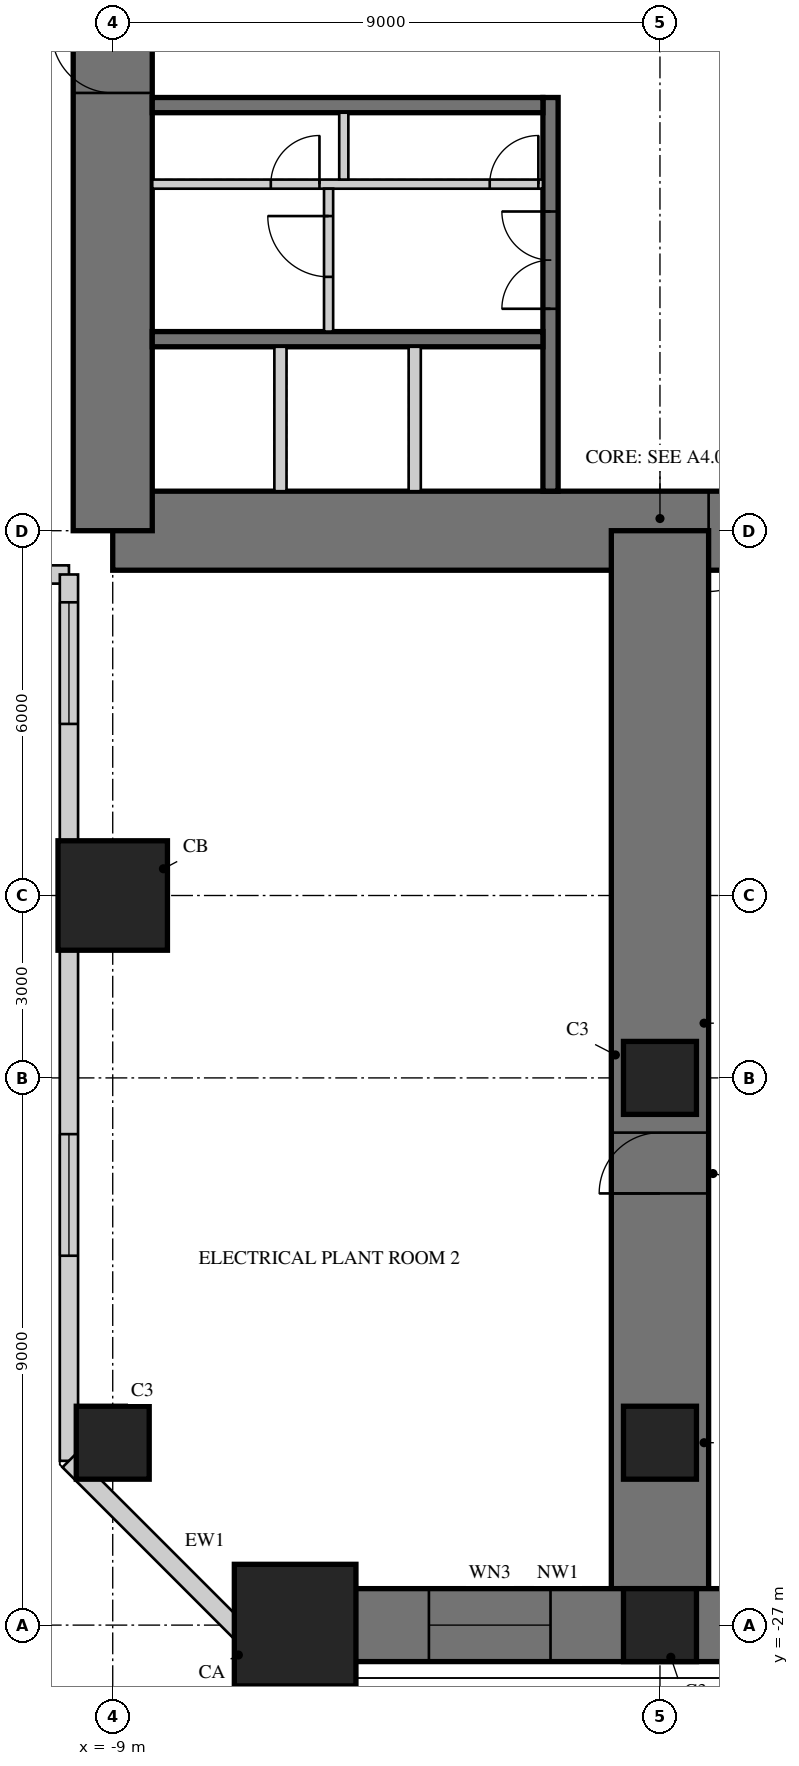
"""IFC4 building model, lengths in metres.
Left out: names, types, materials, properties, quantities, classifications, styles, units other than length and angle.
Written with IfcOpenShell. Run it as: python <this file> out.ifc"""

import sys

from ifc_helpers import new_model, si_unit, direction, frame, frame_2d, origin, origin_2d, place, context, subcontext, project, spatial, rectangle, hollow_rectangle, extrude, element, fill, save


model = new_model("IFC4")
c1 = context("Model", 3, precision=1e-05, world=origin(), true_north=direction((0.0, 1.0)))
c2 = subcontext(c1, "Body", "Model", "MODEL_VIEW")
j1 = project(units=[si_unit("LENGTHUNIT", "METRE"), si_unit("PLANEANGLEUNIT", "RADIAN")], contexts=[c1])
p1 = place(None, origin())
s1 = spatial("IfcSite", under=j1, at=p1, CompositionType="ELEMENT")
p2 = place(p1, origin())
s2 = spatial("IfcBuilding", under=s1, at=p2, CompositionType="ELEMENT")
p3 = place(p2, frame((0.0, 0.0, 18.5)))
s3 = spatial("IfcBuildingStorey", under=s2, at=p3, CompositionType="ELEMENT", Elevation=18.5)
p4 = place(p3, frame((-9.0, -9.0, 0.0), z_axis=(0.0, 0.0, 1.0), x_axis=(1.0, 0.0, 0.0)))
e1 = element("IfcWall", 1, at=p4, inside=s3, PredefinedType="SHEAR", context=c2, shape_type="SweptSolid", body=[
    extrude(rectangle(XDim=18.0, YDim=1.3, at=frame_2d((9.0, 0.0))), origin(), (0.0, 0.0, 1.0), 5.0),
])
p5 = place(p4, frame((9.8, 0.0, 0.0)))
e2 = element("IfcOpeningElement", 2, at=p5, cuts=e1, PredefinedType="OPENING", context=c2, shape_type="SweptSolid", body=[
    extrude(rectangle(XDim=1.0, YDim=2.4, at=frame_2d((0.5, 1.2))), frame((0.0, 0.66, 0.0), z_axis=(0.0, -1.0, 0.0), x_axis=(1.0, 0.0, 0.0)), (0.0, 0.0, 1.0), 1.32),
])
p6 = place(p3, frame((-9.0, 9.0, 0.0), z_axis=(0.0, 0.0, 1.0), x_axis=(0.0, -1.0, 0.0)))
e3 = element("IfcWall", 3, at=p6, inside=s3, PredefinedType="SHEAR", context=c2, shape_type="SweptSolid", body=[
    extrude(rectangle(XDim=18.0, YDim=1.3, at=frame_2d((9.0, 0.0))), origin(), (0.0, 0.0, 1.0), 5.0),
])
p7 = place(p6, frame((9.8, 0.0, 0.0)))
e4 = element("IfcOpeningElement", 4, at=p7, cuts=e3, PredefinedType="OPENING", context=c2, shape_type="SweptSolid", body=[
    extrude(rectangle(XDim=1.0, YDim=2.4, at=frame_2d((0.5, 1.2))), frame((0.0, 0.66, 0.0), z_axis=(0.0, -1.0, 0.0), x_axis=(1.0, 0.0, 0.0)), (0.0, 0.0, 1.0), 1.32),
])
p8 = place(p3, frame((-1.8, -1.875, 0.0), z_axis=(0.0, 0.0, 1.0), x_axis=(0.0, -1.0, 0.0)))
e5 = element("IfcWall", 5, at=p8, inside=s3, PredefinedType="SHEAR", context=c2, shape_type="SweptSolid", body=[
    extrude(rectangle(XDim=6.475, YDim=0.25, at=frame_2d((3.238, 0.0))), origin(), (0.0, 0.0, 1.0), 5.0),
])
p9 = place(p8, frame((1.875, 0.0, 0.0)))
e6 = element("IfcOpeningElement", 6, at=p9, cuts=e5, PredefinedType="OPENING", context=c2, shape_type="SweptSolid", body=[
    extrude(rectangle(XDim=1.6, YDim=2.4, at=frame_2d((0.8, 1.2))), frame((0.0, 0.135, 0.0), z_axis=(0.0, -1.0, 0.0), x_axis=(1.0, 0.0, 0.0)), (0.0, 0.0, 1.0), 0.27),
])
for number, where, z_axis, x_axis in (
    (7, (-1.925, -2.0, 0.0), (0.0, 0.0, 1.0), (-1.0, 0.0, 0.0)),
    (8, (-1.925, -5.85, 0.0), (0.0, 0.0, 1.0), (-1.0, 0.0, 0.0)),
):
    element("IfcWall", number, at=place(p3, frame(where, z_axis=z_axis, x_axis=x_axis)), inside=s3, PredefinedType="SHEAR", context=c2, shape_type="SweptSolid", body=[
        extrude(rectangle(XDim=6.425, YDim=0.25, at=frame_2d((3.212, 0.0))), origin(), (0.0, 0.0, 1.0), 5.0),
    ])
p10 = place(p3, frame((-1.925, -3.3, 0.0), z_axis=(0.0, 0.0, 1.0), x_axis=(-1.0, 0.0, 0.0)))
e9 = element("IfcWall", 9, at=p10, inside=s3, PredefinedType="PARTITIONING", context=c2, shape_type="SweptSolid", body=[
    extrude(rectangle(XDim=6.425, YDim=0.15, at=frame_2d((3.212, 0.0))), origin(), (0.0, 0.0, 1.0), 5.0),
])
p11 = place(p10, frame((0.075, 0.0, 0.0)))
e10 = element("IfcOpeningElement", 10, at=p11, cuts=e9, PredefinedType="OPENING", context=c2, shape_type="SweptSolid", body=[
    extrude(rectangle(XDim=0.8, YDim=2.1, at=frame_2d((0.4, 1.05))), frame((0.0, 0.085, 0.0), z_axis=(0.0, -1.0, 0.0), x_axis=(1.0, 0.0, 0.0)), (0.0, 0.0, 1.0), 0.17),
])
p12 = place(p10, frame((3.675, 0.0, 0.0)))
e11 = element("IfcOpeningElement", 11, at=p12, cuts=e9, PredefinedType="OPENING", context=c2, shape_type="SweptSolid", body=[
    extrude(rectangle(XDim=0.8, YDim=2.1, at=frame_2d((0.4, 1.05))), frame((0.0, 0.085, 0.0), z_axis=(0.0, -1.0, 0.0), x_axis=(1.0, 0.0, 0.0)), (0.0, 0.0, 1.0), 0.17),
])
p13 = place(p3, frame((-5.2, -2.125, 0.0), z_axis=(0.0, 0.0, 1.0), x_axis=(0.0, -1.0, 0.0)))
e12 = element("IfcWall", 12, at=p13, inside=s3, PredefinedType="PARTITIONING", context=c2, shape_type="SweptSolid", body=[
    extrude(rectangle(XDim=1.1, YDim=0.15, at=frame_2d((0.55, 0.0))), origin(), (0.0, 0.0, 1.0), 5.0),
])
for number, where, z_axis, x_axis in (
    (13, (-4.033, -5.975, 0.0), (0.0, 0.0, 1.0), (0.0, -1.0, 0.0)),
    (14, (-6.242, -5.975, 0.0), (0.0, 0.0, 1.0), (0.0, -1.0, 0.0)),
):
    element("IfcWall", number, at=place(p3, frame(where, z_axis=z_axis, x_axis=x_axis)), inside=s3, PredefinedType="PARTITIONING", context=c2, shape_type="SweptSolid", body=[
        extrude(rectangle(XDim=2.375, YDim=0.2, at=frame_2d((1.188, 0.0))), origin(), (0.0, 0.0, 1.0), 5.0),
    ])
p14 = place(p3, frame((0.0, -9.0, 0.0), z_axis=(0.0, 0.0, 1.0), x_axis=(0.0, -1.0, 0.0)))
e15 = element("IfcWall", 15, at=p14, inside=s3, PredefinedType="SHEAR", context=c2, shape_type="SweptSolid", body=[
    extrude(rectangle(XDim=18.0, YDim=1.6, at=frame_2d((9.0, 0.0))), origin(), (0.0, 0.0, 1.0), 5.0),
])
p15 = place(p14, frame((9.9, 0.0, 0.0)))
e16 = element("IfcOpeningElement", 16, at=p15, cuts=e15, PredefinedType="OPENING", context=c2, shape_type="SweptSolid", body=[
    extrude(rectangle(XDim=1.0, YDim=2.2, at=frame_2d((0.5, 1.1))), frame((0.0, 0.81, 0.0), z_axis=(0.0, -1.0, 0.0), x_axis=(1.0, 0.0, 0.0)), (0.0, 0.0, 1.0), 1.62),
])
p16 = place(p3, frame((-6.0, -27.0, 0.0), z_axis=(0.0, 0.0, 1.0), x_axis=(1.0, 0.0, 0.0)))
e17 = element("IfcWall", 17, at=p16, inside=s3, PredefinedType="SHEAR", context=c2, shape_type="SweptSolid", body=[
    extrude(rectangle(XDim=12.0, YDim=1.2, at=frame_2d((6.0, 0.0))), origin(), (0.0, 0.0, 1.0), 5.0),
])
p17 = place(p16, frame((2.2, 0.0, 0.8)))
e18 = element("IfcOpeningElement", 18, at=p17, cuts=e17, PredefinedType="OPENING", context=c2, shape_type="SweptSolid", body=[
    extrude(rectangle(XDim=2.0, YDim=2.5, at=frame_2d((1.0, 1.25))), frame((0.0, 0.61, 0.0), z_axis=(0.0, -1.0, 0.0), x_axis=(1.0, 0.0, 0.0)), (0.0, 0.0, 1.0), 1.22),
])
p18 = place(p16, frame((7.8, 0.0, 0.8)))
e19 = element("IfcOpeningElement", 19, at=p18, cuts=e17, PredefinedType="OPENING", context=c2, shape_type="SweptSolid", body=[
    extrude(rectangle(XDim=2.0, YDim=2.5, at=frame_2d((1.0, 1.25))), frame((0.0, 0.61, 0.0), z_axis=(0.0, -1.0, 0.0), x_axis=(1.0, 0.0, 0.0)), (0.0, 0.0, 1.0), 1.22),
])
p19 = place(p3, frame((-9.0, -15.0, 0.0), z_axis=(0.0, 0.0, 1.0), x_axis=(1.0, 0.0, 0.0)))
e20 = element("IfcColumn", 20, at=p19, inside=s3, PredefinedType="COLUMN", context=c2, shape_type="SweptSolid", body=[
    extrude(rectangle(XDim=1.8, YDim=1.8, at=origin_2d()), origin(), (0.0, 0.0, 1.0), 5.0),
])
p20 = place(p3, frame((-9.0, -24.0, 0.0), z_axis=(0.0, 0.0, 1.0), x_axis=(1.0, 0.0, 0.0)))
e21 = element("IfcColumn", 21, at=p20, inside=s3, PredefinedType="COLUMN", context=c2, shape_type="SweptSolid", body=[
    extrude(rectangle(XDim=1.2, YDim=1.2, at=origin_2d()), origin(), (0.0, 0.0, 1.0), 5.0),
])
p21 = place(p3, frame((-6.0, -27.0, 0.0), z_axis=(0.0, 0.0, 1.0), x_axis=(1.0, 0.0, 0.0)))
e22 = element("IfcColumn", 22, at=p21, inside=s3, PredefinedType="COLUMN", context=c2, shape_type="SweptSolid", body=[
    extrude(rectangle(XDim=2.0, YDim=2.0, at=origin_2d()), origin(), (0.0, 0.0, 1.0), 5.0),
])
for number, where, z_axis, x_axis in (
    (23, (0.0, -27.0, 0.0), (0.0, 0.0, 1.0), (1.0, 0.0, 0.0)),
    (24, (0.0, -18.0, 0.0), (0.0, 0.0, 1.0), (1.0, 0.0, 0.0)),
    (25, (0.0, -24.0, 0.0), (0.0, 0.0, 1.0), (1.0, 0.0, 0.0)),
):
    element("IfcColumn", number, at=place(p3, frame(where, z_axis=z_axis, x_axis=x_axis)), inside=s3, PredefinedType="COLUMN", context=c2, shape_type="SweptSolid", body=[
        extrude(rectangle(XDim=1.2, YDim=1.2, at=origin_2d()), origin(), (0.0, 0.0, 1.0), 5.0),
    ])
p22 = place(p3, frame((-24.298, -9.72, 0.0), z_axis=(0.0, 0.0, 1.0), x_axis=(1.0, 0.0, 0.0)))
e26 = element("IfcWall", 26, at=p22, inside=s3, PredefinedType="SOLIDWALL", context=c2, shape_type="SweptSolid", body=[
    extrude(rectangle(XDim=14.578, YDim=0.3, at=frame_2d((7.289, 0.0))), origin(), (0.0, 0.0, 1.0), 4.8),
])
p23 = place(p22, frame((3.374, 0.0, 0.8)))
e27 = element("IfcOpeningElement", 27, at=p23, cuts=e26, PredefinedType="OPENING", context=c2, shape_type="SweptSolid", body=[
    extrude(rectangle(XDim=2.0, YDim=2.5, at=frame_2d((1.0, 1.25))), frame((0.0, 0.16, 0.0), z_axis=(0.0, -1.0, 0.0), x_axis=(1.0, 0.0, 0.0)), (0.0, 0.0, 1.0), 0.32),
])
p24 = place(p22, frame((12.12, 0.0, 0.8)))
e28 = element("IfcOpeningElement", 28, at=p24, cuts=e26, PredefinedType="OPENING", context=c2, shape_type="SweptSolid", body=[
    extrude(rectangle(XDim=2.0, YDim=2.5, at=frame_2d((1.0, 1.25))), frame((0.0, 0.16, 0.0), z_axis=(0.0, -1.0, 0.0), x_axis=(1.0, 0.0, 0.0)), (0.0, 0.0, 1.0), 0.32),
])
p25 = place(p3, frame((-9.72, -9.72, 0.0), z_axis=(0.0, 0.0, 1.0), x_axis=(0.0, -1.0, 0.0)))
e29 = element("IfcWall", 29, at=p25, inside=s3, PredefinedType="SOLIDWALL", context=c2, shape_type="SweptSolid", body=[
    extrude(rectangle(XDim=14.578, YDim=0.3, at=frame_2d((7.289, 0.0))), origin(), (0.0, 0.0, 1.0), 4.8),
])
p26 = place(p25, frame((0.458, 0.0, 0.8)))
e30 = element("IfcOpeningElement", 30, at=p26, cuts=e29, PredefinedType="OPENING", context=c2, shape_type="SweptSolid", body=[
    extrude(rectangle(XDim=2.0, YDim=2.5, at=frame_2d((1.0, 1.25))), frame((0.0, 0.16, 0.0), z_axis=(0.0, -1.0, 0.0), x_axis=(1.0, 0.0, 0.0)), (0.0, 0.0, 1.0), 0.32),
])
p27 = place(p25, frame((9.205, 0.0, 0.8)))
e31 = element("IfcOpeningElement", 31, at=p27, cuts=e29, PredefinedType="OPENING", context=c2, shape_type="SweptSolid", body=[
    extrude(rectangle(XDim=2.0, YDim=2.5, at=frame_2d((1.0, 1.25))), frame((0.0, 0.16, 0.0), z_axis=(0.0, -1.0, 0.0), x_axis=(1.0, 0.0, 0.0)), (0.0, 0.0, 1.0), 0.32),
])
p28 = place(p3, frame((-9.72, -24.298, 0.0), z_axis=(0.0, 0.0, 1.0), x_axis=(0.707106781187, -0.707106781187, 0.0)))
e32 = element("IfcWall", 32, at=p28, inside=s3, PredefinedType="SOLIDWALL", context=c2, shape_type="SweptSolid", body=[
    extrude(rectangle(XDim=4.669, YDim=0.3, at=frame_2d((2.335, 0.0))), origin(), (0.0, 0.0, 1.0), 4.8),
])
p29 = place(p3, frame((-5.45, -3.375, 0.0), z_axis=(0.0, 0.0, 1.0), x_axis=(0.0, -1.0, 0.0)))
e33 = element("IfcWall", 33, at=p29, inside=s3, PredefinedType="PARTITIONING", context=c2, shape_type="SweptSolid", body=[
    extrude(rectangle(XDim=2.35, YDim=0.15, at=frame_2d((1.175, 0.0))), origin(), (0.0, 0.0, 1.0), 4.8),
])
p30 = place(p29, frame((0.45, 0.0, 0.0)))
e34 = element("IfcOpeningElement", 34, at=p30, cuts=e33, PredefinedType="OPENING", context=c2, shape_type="SweptSolid", body=[
    extrude(rectangle(XDim=1.0, YDim=2.1, at=frame_2d((0.5, 1.05))), frame((0.0, 0.085, 0.0), z_axis=(0.0, -1.0, 0.0), x_axis=(1.0, 0.0, 0.0)), (0.0, 0.0, 1.0), 0.17),
])
p31 = place(p26, origin())
e35 = element("IfcWindow", 35, at=p31, inside=s3, PartitioningType="SINGLE_PANEL", PredefinedType="WINDOW", context=c2, shape_type="SweptSolid", body=[
    extrude(hollow_rectangle(XDim=2.0, YDim=2.5, WallThickness=0.06, at=frame_2d((1.0, 1.25))), frame((0.0, 0.03, 0.0), z_axis=(0.0, -1.0, 0.0), x_axis=(1.0, 0.0, 0.0)), (0.0, 0.0, 1.0), 0.06),
    extrude(rectangle(XDim=1.879, YDim=2.379, at=frame_2d((1.0, 1.25))), frame((0.0, 0.03, 0.0), z_axis=(0.0, -1.0, 0.0), x_axis=(1.0, 0.0, 0.0)), (0.0, 0.0, 1.0), 0.06),
])
fill(e30, e35)
p32 = place(p27, origin())
e36 = element("IfcWindow", 36, at=p32, inside=s3, PartitioningType="SINGLE_PANEL", PredefinedType="WINDOW", context=c2, shape_type="SweptSolid", body=[
    extrude(hollow_rectangle(XDim=2.0, YDim=2.5, WallThickness=0.06, at=frame_2d((1.0, 1.25))), frame((0.0, 0.03, 0.0), z_axis=(0.0, -1.0, 0.0), x_axis=(1.0, 0.0, 0.0)), (0.0, 0.0, 1.0), 0.06),
    extrude(rectangle(XDim=1.879, YDim=2.379, at=frame_2d((1.0, 1.25))), frame((0.0, 0.03, 0.0), z_axis=(0.0, -1.0, 0.0), x_axis=(1.0, 0.0, 0.0)), (0.0, 0.0, 1.0), 0.06),
])
fill(e31, e36)
p33 = place(p17, origin())
e37 = element("IfcWindow", 37, at=p33, inside=s3, PartitioningType="SINGLE_PANEL", PredefinedType="WINDOW", context=c2, shape_type="SweptSolid", body=[
    extrude(hollow_rectangle(XDim=2.0, YDim=2.5, WallThickness=0.06, at=frame_2d((1.0, 1.25))), frame((0.0, 0.03, 0.0), z_axis=(0.0, -1.0, 0.0), x_axis=(1.0, 0.0, 0.0)), (0.0, 0.0, 1.0), 0.06),
    extrude(rectangle(XDim=1.879, YDim=2.379, at=frame_2d((1.0, 1.25))), frame((0.0, 0.03, 0.0), z_axis=(0.0, -1.0, 0.0), x_axis=(1.0, 0.0, 0.0)), (0.0, 0.0, 1.0), 0.06),
])
fill(e18, e37)
p34 = place(p30, frame((1.0, 0.0, 0.0), z_axis=(0.0, 0.0, 1.0), x_axis=(-1.0, 0.0, 0.0)))
e38 = element("IfcDoor", 38, at=p34, inside=s3, OperationType="SINGLE_SWING_RIGHT", PredefinedType="DOOR", context=c2, shape_type="SweptSolid", body=[
    extrude(rectangle(XDim=1.0, YDim=2.1, at=frame_2d((0.5, 1.05))), frame((0.0, 0.025, 0.0), z_axis=(0.0, -1.0, 0.0), x_axis=(1.0, 0.0, 0.0)), (0.0, 0.0, 1.0), 0.05),
])
fill(e34, e38)
p35 = place(p15, frame((1.0, 0.0, 0.0), z_axis=(0.0, 0.0, 1.0), x_axis=(-1.0, 0.0, 0.0)))
e39 = element("IfcDoor", 39, at=p35, inside=s3, OperationType="SINGLE_SWING_LEFT", PredefinedType="DOOR", context=c2, shape_type="SweptSolid", body=[
    extrude(rectangle(XDim=1.0, YDim=2.2, at=frame_2d((0.5, 1.1))), frame((0.0, 0.025, 0.0), z_axis=(0.0, -1.0, 0.0), x_axis=(1.0, 0.0, 0.0)), (0.0, 0.0, 1.0), 0.05),
])
fill(e16, e39)
p36 = place(p5, frame((1.0, 0.0, 0.0), z_axis=(0.0, 0.0, 1.0), x_axis=(-1.0, 0.0, 0.0)))
e40 = element("IfcDoor", 40, at=p36, inside=s3, OperationType="SINGLE_SWING_RIGHT", PredefinedType="DOOR", context=c2, shape_type="SweptSolid", body=[
    extrude(rectangle(XDim=1.0, YDim=2.4, at=frame_2d((0.5, 1.2))), frame((0.0, -0.005, 0.0), z_axis=(0.0, -1.0, 0.0), x_axis=(1.0, 0.0, 0.0)), (0.0, 0.0, 1.0), 0.05),
])
fill(e2, e40)
p37 = place(p7, frame((1.0, 0.0, 0.0), z_axis=(0.0, 0.0, 1.0), x_axis=(-1.0, 0.0, 0.0)))
e41 = element("IfcDoor", 41, at=p37, inside=s3, OperationType="SINGLE_SWING_RIGHT", PredefinedType="DOOR", context=c2, shape_type="SweptSolid", body=[
    extrude(rectangle(XDim=1.0, YDim=2.4, at=frame_2d((0.5, 1.2))), frame((0.0, -0.005, 0.0), z_axis=(0.0, -1.0, 0.0), x_axis=(1.0, 0.0, 0.0)), (0.0, 0.0, 1.0), 0.05),
])
fill(e4, e41)
p38 = place(p9, frame((1.6, 0.0, 0.0), z_axis=(0.0, 0.0, 1.0), x_axis=(-1.0, 0.0, 0.0)))
e42 = element("IfcDoor", 42, at=p38, inside=s3, OperationType="DOUBLE_DOOR_SINGLE_SWING", PredefinedType="DOOR", context=c2, shape_type="SweptSolid", body=[
    extrude(rectangle(XDim=1.6, YDim=2.4, at=frame_2d((0.8, 1.2))), frame((0.0, 0.025, 0.0), z_axis=(0.0, -1.0, 0.0), x_axis=(1.0, 0.0, 0.0)), (0.0, 0.0, 1.0), 0.05),
])
fill(e6, e42)
p39 = place(p11, frame((0.8, 0.0, 0.0), z_axis=(0.0, 0.0, 1.0), x_axis=(-1.0, 0.0, 0.0)))
e43 = element("IfcDoor", 43, at=p39, inside=s3, OperationType="SINGLE_SWING_RIGHT", PredefinedType="DOOR", context=c2, shape_type="SweptSolid", body=[
    extrude(rectangle(XDim=0.8, YDim=2.1, at=frame_2d((0.4, 1.05))), frame((0.0, 0.025, 0.0), z_axis=(0.0, -1.0, 0.0), x_axis=(1.0, 0.0, 0.0)), (0.0, 0.0, 1.0), 0.05),
])
fill(e10, e43)
p40 = place(p12, frame((0.8, 0.0, 0.0), z_axis=(0.0, 0.0, 1.0), x_axis=(-1.0, 0.0, 0.0)))
e44 = element("IfcDoor", 44, at=p40, inside=s3, OperationType="SINGLE_SWING_RIGHT", PredefinedType="DOOR", context=c2, shape_type="SweptSolid", body=[
    extrude(rectangle(XDim=0.8, YDim=2.1, at=frame_2d((0.4, 1.05))), frame((0.0, 0.025, 0.0), z_axis=(0.0, -1.0, 0.0), x_axis=(1.0, 0.0, 0.0)), (0.0, 0.0, 1.0), 0.05),
])
fill(e11, e44)
save(model, sys.argv[1])
